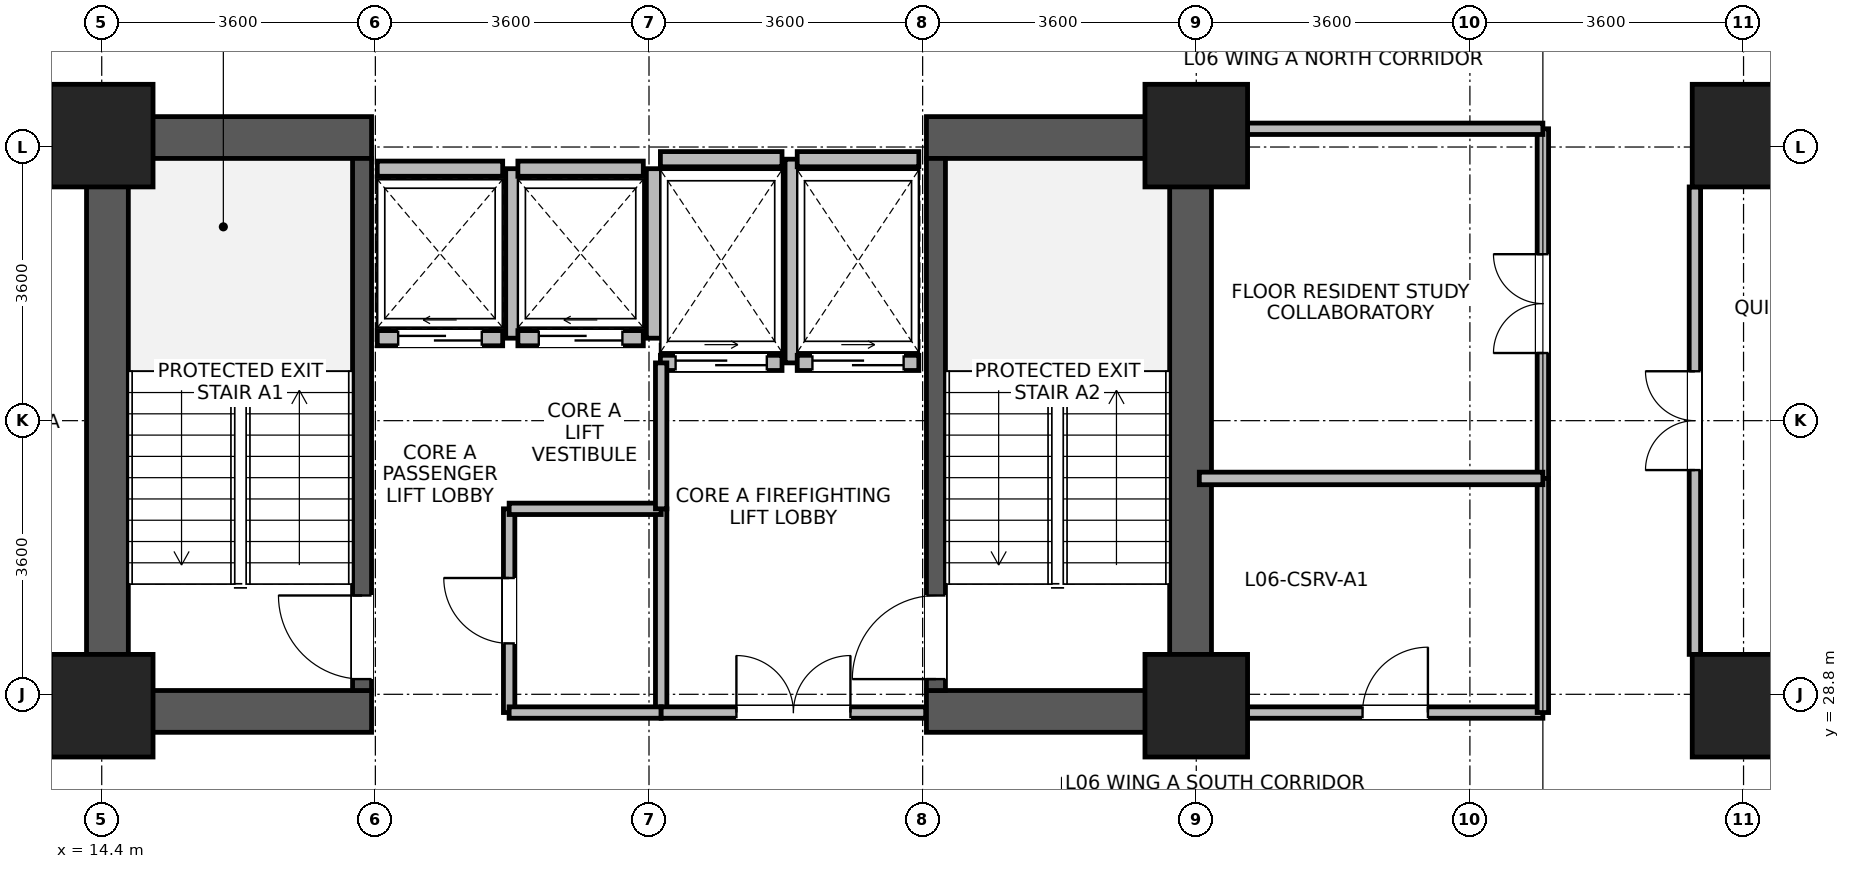
"""IFC4 building model, lengths in metres.
Left out: names, types, materials, properties, quantities, classifications, styles, units other than length and angle.
Written with IfcOpenShell. Run it as: python <this file> out.ifc"""

import sys

from ifc_helpers import new_model, si_unit, direction, frame, frame_2d, origin, origin_2d, place, context, subcontext, project, spatial, rectangle, extrude, source, transform, mapped, element, fill, save


model = new_model("IFC4")
c1 = context("Model", 3, precision=1e-05, world=origin(), true_north=direction((0.0, 1.0)))
c2 = subcontext(c1, "Body", "Model", "MODEL_VIEW")
j1 = project(units=[si_unit("LENGTHUNIT", "METRE"), si_unit("PLANEANGLEUNIT", "RADIAN")], contexts=[c1])
p1 = place(None, origin())
s1 = spatial("IfcSite", under=j1, at=p1, CompositionType="ELEMENT")
p2 = place(p1, origin())
s2 = spatial("IfcBuilding", under=s1, at=p2, CompositionType="ELEMENT")
p3 = place(p2, frame((0.0, 0.0, 29.0)))
s3 = spatial("IfcBuildingStorey", under=s2, at=p3, CompositionType="ELEMENT", Elevation=29.0)
for number, where, z_axis, x_axis in (
    (1, (14.475, 28.3, 0.0), (0.0, 0.0, 1.0), (0.0, 1.0, 0.0)),
    (2, (28.725, 28.3, 0.0), (0.0, 0.0, 1.0), (0.0, 1.0, 0.0)),
):
    element("IfcWall", number, at=place(p3, frame(where, z_axis=z_axis, x_axis=x_axis)), inside=s3, PredefinedType="SHEAR", context=c2, shape_type="SweptSolid", body=[
        extrude(rectangle(XDim=8.1, YDim=0.55, at=frame_2d((4.05, 0.0))), origin(), (0.0, 0.0, 1.0), 3.45),
    ])
for number, where, z_axis, x_axis in (
    (3, (14.75, 28.575, 0.0), (0.0, 0.0, 1.0), (1.0, 0.0, 0.0)),
    (4, (25.25, 28.575, 0.0), (0.0, 0.0, 1.0), (1.0, 0.0, 0.0)),
    (5, (14.75, 36.125, 0.0), (0.0, 0.0, 1.0), (1.0, 0.0, 0.0)),
    (6, (25.25, 36.125, 0.0), (0.0, 0.0, 1.0), (1.0, 0.0, 0.0)),
):
    element("IfcWall", number, at=place(p3, frame(where, z_axis=z_axis, x_axis=x_axis)), inside=s3, PredefinedType="SHEAR", context=c2, shape_type="SweptSolid", body=[
        extrude(rectangle(XDim=3.2, YDim=0.55, at=frame_2d((1.6, 0.0))), origin(), (0.0, 0.0, 1.0), 3.45),
    ])
p4 = place(p3, frame((17.825, 28.85, 0.0), z_axis=(0.0, 0.0, 1.0), x_axis=(0.0, 1.0, 0.0)))
e7 = element("IfcWall", 7, at=p4, inside=s3, PredefinedType="SHEAR", context=c2, shape_type="SweptSolid", body=[
    extrude(rectangle(XDim=7.0, YDim=0.25, at=frame_2d((3.5, 0.0))), origin(), (0.0, 0.0, 1.0), 3.45),
])
p5 = place(p4, frame((0.15, 0.0, 0.0)))
e8 = element("IfcOpeningElement", 8, at=p5, cuts=e7, PredefinedType="OPENING", context=c2, shape_type="SweptSolid", body=[
    extrude(rectangle(XDim=1.1, YDim=2.08, at=frame_2d((0.55, 1.04))), frame((0.0, 0.135, 0.0), z_axis=(0.0, -1.0, 0.0), x_axis=(1.0, 0.0, 0.0)), (0.0, 0.0, 1.0), 0.27),
])
p6 = place(p3, frame((25.375, 28.85, 0.0), z_axis=(0.0, 0.0, 1.0), x_axis=(0.0, 1.0, 0.0)))
e9 = element("IfcWall", 9, at=p6, inside=s3, PredefinedType="SHEAR", context=c2, shape_type="SweptSolid", body=[
    extrude(rectangle(XDim=7.0, YDim=0.25, at=frame_2d((3.5, 0.0))), origin(), (0.0, 0.0, 1.0), 3.45),
])
p7 = place(p6, frame((0.15, 0.0, 0.0)))
e10 = element("IfcOpeningElement", 10, at=p7, cuts=e9, PredefinedType="OPENING", context=c2, shape_type="SweptSolid", body=[
    extrude(rectangle(XDim=1.1, YDim=2.08, at=frame_2d((0.55, 1.04))), frame((0.0, 0.135, 0.0), z_axis=(0.0, -1.0, 0.0), x_axis=(1.0, 0.0, 0.0)), (0.0, 0.0, 1.0), 0.27),
])
m1 = source(origin(), c2, "Body", "SweptSolid", [
    extrude(rectangle(XDim=1.35, YDim=1.35, at=origin_2d()), origin(), (0.0, 0.0, 1.0), 3.7),
])
for number, where, z_axis, x_axis in (
    (11, (14.4, 28.65, 0.0), (0.0, 0.0, 1.0), (1.0, 0.0, 0.0)),
    (12, (14.4, 36.15, 0.0), (0.0, 0.0, 1.0), (1.0, 0.0, 0.0)),
    (13, (28.8, 28.65, 0.0), (0.0, 0.0, 1.0), (1.0, 0.0, 0.0)),
    (14, (28.8, 36.15, 0.0), (0.0, 0.0, 1.0), (1.0, 0.0, 0.0)),
    (15, (36.0, 28.65, 0.0), (0.0, 0.0, 1.0), (1.0, 0.0, 0.0)),
    (16, (36.0, 36.15, 0.0), (0.0, 0.0, 1.0), (1.0, 0.0, 0.0)),
):
    element("IfcColumn", number, at=place(p3, frame(where, z_axis=z_axis, x_axis=x_axis)), inside=s3, PredefinedType="COLUMN", context=c2, shape_type="MappedRepresentation", body=[
        mapped(m1, transform((0.0, 0.0, 0.0), x_axis=(1.0, 0.0, 0.0), y_axis=(0.0, 1.0, 0.0), z_axis=(0.0, 0.0, 1.0), scale=1.0)),
    ])
p8 = place(p3, frame((18.025, 33.485, 0.0), z_axis=(0.0, 0.0, 1.0), x_axis=(1.0, 0.0, 0.0)))
e17 = element("IfcWall", 17, at=p8, inside=s3, PredefinedType="PARTITIONING", context=c2, shape_type="SweptSolid", body=[
    extrude(rectangle(XDim=1.65, YDim=0.2, at=frame_2d((0.825, 0.0))), origin(), (0.0, 0.0, 1.0), 3.43),
])
p9 = place(p8, frame((0.275, 0.0, 0.0)))
e18 = element("IfcOpeningElement", 18, at=p9, cuts=e17, PredefinedType="OPENING", context=c2, shape_type="SweptSolid", body=[
    extrude(rectangle(XDim=1.1, YDim=2.12, at=frame_2d((0.55, 1.06))), frame((0.0, 0.11, 0.0), z_axis=(0.0, -1.0, 0.0), x_axis=(1.0, 0.0, 0.0)), (0.0, 0.0, 1.0), 0.22),
])
p10 = place(p3, frame((18.025, 35.715, 0.0), z_axis=(0.0, 0.0, 1.0), x_axis=(1.0, 0.0, 0.0)))
e19 = element("IfcWall", 19, at=p10, inside=s3, PredefinedType="PARTITIONING", context=c2, shape_type="SweptSolid", body=[
    extrude(rectangle(XDim=1.65, YDim=0.2, at=frame_2d((0.825, 0.0))), origin(), (0.0, 0.0, 1.0), 2.23),
])
p11 = place(p3, frame((19.815, 33.485, 0.0), z_axis=(0.0, 0.0, 1.0), x_axis=(0.0, 1.0, 0.0)))
e20 = element("IfcWall", 20, at=p11, inside=s3, PredefinedType="PARTITIONING", context=c2, shape_type="SweptSolid", body=[
    extrude(rectangle(XDim=2.23, YDim=0.2, at=frame_2d((1.115, 0.0))), origin(), (0.0, 0.0, 1.0), 3.43),
])
p12 = place(p3, frame((19.875, 33.485, 0.0), z_axis=(0.0, 0.0, 1.0), x_axis=(1.0, 0.0, 0.0)))
e21 = element("IfcWall", 21, at=p12, inside=s3, PredefinedType="PARTITIONING", context=c2, shape_type="SweptSolid", body=[
    extrude(rectangle(XDim=1.65, YDim=0.2, at=frame_2d((0.825, 0.0))), origin(), (0.0, 0.0, 1.0), 3.43),
])
p13 = place(p12, frame((0.275, 0.0, 0.0)))
e22 = element("IfcOpeningElement", 22, at=p13, cuts=e21, PredefinedType="OPENING", context=c2, shape_type="SweptSolid", body=[
    extrude(rectangle(XDim=1.1, YDim=2.12, at=frame_2d((0.55, 1.06))), frame((0.0, 0.11, 0.0), z_axis=(0.0, -1.0, 0.0), x_axis=(1.0, 0.0, 0.0)), (0.0, 0.0, 1.0), 0.22),
])
p14 = place(p3, frame((19.875, 35.715, 0.0), z_axis=(0.0, 0.0, 1.0), x_axis=(1.0, 0.0, 0.0)))
e23 = element("IfcWall", 23, at=p14, inside=s3, PredefinedType="PARTITIONING", context=c2, shape_type="SweptSolid", body=[
    extrude(rectangle(XDim=1.65, YDim=0.2, at=frame_2d((0.825, 0.0))), origin(), (0.0, 0.0, 1.0), 2.23),
])
p15 = place(p3, frame((21.665, 33.485, 0.0), z_axis=(0.0, 0.0, 1.0), x_axis=(0.0, 1.0, 0.0)))
e24 = element("IfcWall", 24, at=p15, inside=s3, PredefinedType="PARTITIONING", context=c2, shape_type="SweptSolid", body=[
    extrude(rectangle(XDim=2.23, YDim=0.2, at=frame_2d((1.115, 0.0))), origin(), (0.0, 0.0, 1.0), 3.43),
])
p16 = place(p3, frame((21.75, 33.16, 0.0), z_axis=(0.0, 0.0, 1.0), x_axis=(1.0, 0.0, 0.0)))
e25 = element("IfcWall", 25, at=p16, inside=s3, PredefinedType="PARTITIONING", context=c2, shape_type="SweptSolid", body=[
    extrude(rectangle(XDim=1.6, YDim=0.2, at=frame_2d((0.8, 0.0))), origin(), (0.0, 0.0, 1.0), 3.43),
])
p17 = place(p16, frame((0.2, 0.0, 0.0)))
e26 = element("IfcOpeningElement", 26, at=p17, cuts=e25, PredefinedType="OPENING", context=c2, shape_type="SweptSolid", body=[
    extrude(rectangle(XDim=1.2, YDim=2.12, at=frame_2d((0.6, 1.06))), frame((0.0, 0.11, 0.0), z_axis=(0.0, -1.0, 0.0), x_axis=(1.0, 0.0, 0.0)), (0.0, 0.0, 1.0), 0.22),
])
p18 = place(p3, frame((21.75, 35.84, 0.0), z_axis=(0.0, 0.0, 1.0), x_axis=(1.0, 0.0, 0.0)))
e27 = element("IfcWall", 27, at=p18, inside=s3, PredefinedType="PARTITIONING", context=c2, shape_type="SweptSolid", body=[
    extrude(rectangle(XDim=1.6, YDim=0.2, at=frame_2d((0.8, 0.0))), origin(), (0.0, 0.0, 1.0), 2.23),
])
p19 = place(p3, frame((23.49, 33.16, 0.0), z_axis=(0.0, 0.0, 1.0), x_axis=(0.0, 1.0, 0.0)))
e28 = element("IfcWall", 28, at=p19, inside=s3, PredefinedType="PARTITIONING", context=c2, shape_type="SweptSolid", body=[
    extrude(rectangle(XDim=2.68, YDim=0.2, at=frame_2d((1.34, 0.0))), origin(), (0.0, 0.0, 1.0), 3.43),
])
p20 = place(p3, frame((23.55, 33.16, 0.0), z_axis=(0.0, 0.0, 1.0), x_axis=(1.0, 0.0, 0.0)))
e29 = element("IfcWall", 29, at=p20, inside=s3, PredefinedType="PARTITIONING", context=c2, shape_type="SweptSolid", body=[
    extrude(rectangle(XDim=1.6, YDim=0.2, at=frame_2d((0.8, 0.0))), origin(), (0.0, 0.0, 1.0), 3.43),
])
p21 = place(p20, frame((0.2, 0.0, 0.0)))
e30 = element("IfcOpeningElement", 30, at=p21, cuts=e29, PredefinedType="OPENING", context=c2, shape_type="SweptSolid", body=[
    extrude(rectangle(XDim=1.2, YDim=2.12, at=frame_2d((0.6, 1.06))), frame((0.0, 0.11, 0.0), z_axis=(0.0, -1.0, 0.0), x_axis=(1.0, 0.0, 0.0)), (0.0, 0.0, 1.0), 0.22),
])
p22 = place(p3, frame((23.55, 35.84, 0.0), z_axis=(0.0, 0.0, 1.0), x_axis=(1.0, 0.0, 0.0)))
e31 = element("IfcWall", 31, at=p22, inside=s3, PredefinedType="PARTITIONING", context=c2, shape_type="SweptSolid", body=[
    extrude(rectangle(XDim=1.6, YDim=0.2, at=frame_2d((0.8, 0.0))), origin(), (0.0, 0.0, 1.0), 2.23),
])
p23 = place(p3, frame((35.36, 29.325, 0.0), z_axis=(0.0, 0.0, 1.0), x_axis=(0.0, 1.0, 0.0)))
e32 = element("IfcWall", 32, at=p23, inside=s3, PredefinedType="PARTITIONING", context=c2, shape_type="SweptSolid", body=[
    extrude(rectangle(XDim=6.15, YDim=0.15, at=frame_2d((3.075, 0.0))), origin(), (0.0, 0.0, 1.0), 3.43),
])
p24 = place(p23, frame((2.425, 0.0, 0.0)))
e33 = element("IfcOpeningElement", 33, at=p24, cuts=e32, PredefinedType="OPENING", context=c2, shape_type="SweptSolid", body=[
    extrude(rectangle(XDim=1.3, YDim=2.12, at=frame_2d((0.65, 1.06))), frame((0.0, 0.085, 0.0), z_axis=(0.0, -1.0, 0.0), x_axis=(1.0, 0.0, 0.0)), (0.0, 0.0, 1.0), 0.17),
])
p25 = place(p3, frame((33.36, 31.64, 0.0), z_axis=(0.0, 0.0, 1.0), x_axis=(0.0, 1.0, 0.0)))
e34 = element("IfcWall", 34, at=p25, inside=s3, PredefinedType="PARTITIONING", context=c2, shape_type="SweptSolid", body=[
    extrude(rectangle(XDim=4.6, YDim=0.15, at=frame_2d((2.3, 0.0))), origin(), (0.0, 0.0, 1.0), 3.43),
])
p26 = place(p25, frame((1.65, 0.0, 0.0)))
e35 = element("IfcOpeningElement", 35, at=p26, cuts=e34, PredefinedType="OPENING", context=c2, shape_type="SweptSolid", body=[
    extrude(rectangle(XDim=1.3, YDim=2.12, at=frame_2d((0.65, 1.06))), frame((0.0, 0.085, 0.0), z_axis=(0.0, -1.0, 0.0), x_axis=(1.0, 0.0, 0.0)), (0.0, 0.0, 1.0), 0.17),
])
p27 = place(p3, frame((29.475, 28.56, 0.0), z_axis=(0.0, 0.0, 1.0), x_axis=(1.0, 0.0, 0.0)))
e36 = element("IfcWall", 36, at=p27, inside=s3, PredefinedType="PARTITIONING", context=c2, shape_type="SweptSolid", body=[
    extrude(rectangle(XDim=3.885, YDim=0.15, at=frame_2d((1.942, 0.0))), origin(), (0.0, 0.0, 1.0), 2.78),
])
p28 = place(p27, frame((1.512, 0.0, 0.0)))
e37 = element("IfcOpeningElement", 37, at=p28, cuts=e36, PredefinedType="OPENING", context=c2, shape_type="SweptSolid", body=[
    extrude(rectangle(XDim=0.86, YDim=2.02, at=frame_2d((0.43, 1.01))), frame((0.0, 0.085, 0.0), z_axis=(0.0, -1.0, 0.0), x_axis=(1.0, 0.0, 0.0)), (0.0, 0.0, 1.0), 0.17),
])
p29 = place(p3, frame((29.475, 36.24, 0.0), z_axis=(0.0, 0.0, 1.0), x_axis=(1.0, 0.0, 0.0)))
e38 = element("IfcWall", 38, at=p29, inside=s3, PredefinedType="PARTITIONING", context=c2, shape_type="SweptSolid", body=[
    extrude(rectangle(XDim=3.885, YDim=0.15, at=frame_2d((1.942, 0.0))), origin(), (0.0, 0.0, 1.0), 2.78),
])
p30 = place(p3, frame((33.36, 28.56, 0.0), z_axis=(0.0, 0.0, 1.0), x_axis=(0.0, 1.0, 0.0)))
e39 = element("IfcWall", 39, at=p30, inside=s3, PredefinedType="PARTITIONING", context=c2, shape_type="SweptSolid", body=[
    extrude(rectangle(XDim=3.08, YDim=0.15, at=frame_2d((1.54, 0.0))), origin(), (0.0, 0.0, 1.0), 3.43),
])
p31 = place(p3, frame((19.76, 28.56, 0.0), z_axis=(0.0, 0.0, 1.0), x_axis=(0.0, 1.0, 0.0)))
e40 = element("IfcWall", 40, at=p31, inside=s3, PredefinedType="PARTITIONING", context=c2, shape_type="SweptSolid", body=[
    extrude(rectangle(XDim=2.68, YDim=0.15, at=frame_2d((1.34, 0.0))), origin(), (0.0, 0.0, 1.0), 3.43),
])
p32 = place(p31, frame((0.91, 0.0, 0.0)))
e41 = element("IfcOpeningElement", 41, at=p32, cuts=e40, PredefinedType="OPENING", context=c2, shape_type="SweptSolid", body=[
    extrude(rectangle(XDim=0.86, YDim=2.02, at=frame_2d((0.43, 1.01))), frame((0.0, 0.085, 0.0), z_axis=(0.0, -1.0, 0.0), x_axis=(1.0, 0.0, 0.0)), (0.0, 0.0, 1.0), 0.17),
])
p33 = place(p3, frame((21.76, 28.56, 0.0), z_axis=(0.0, 0.0, 1.0), x_axis=(0.0, 1.0, 0.0)))
e42 = element("IfcWall", 42, at=p33, inside=s3, PredefinedType="PARTITIONING", context=c2, shape_type="SweptSolid", body=[
    extrude(rectangle(XDim=2.68, YDim=0.15, at=frame_2d((1.34, 0.0))), origin(), (0.0, 0.0, 1.0), 3.43),
])
p34 = place(p3, frame((19.76, 28.56, 0.0), z_axis=(0.0, 0.0, 1.0), x_axis=(1.0, 0.0, 0.0)))
e43 = element("IfcWall", 43, at=p34, inside=s3, PredefinedType="PARTITIONING", context=c2, shape_type="SweptSolid", body=[
    extrude(rectangle(XDim=2.0, YDim=0.15, at=frame_2d((1.0, 0.0))), origin(), (0.0, 0.0, 1.0), 2.23),
])
p35 = place(p3, frame((19.76, 31.24, 0.0), z_axis=(0.0, 0.0, 1.0), x_axis=(1.0, 0.0, 0.0)))
e44 = element("IfcWall", 44, at=p35, inside=s3, PredefinedType="PARTITIONING", context=c2, shape_type="SweptSolid", body=[
    extrude(rectangle(XDim=2.0, YDim=0.15, at=frame_2d((1.0, 0.0))), origin(), (0.0, 0.0, 1.0), 3.43),
])
p36 = place(p3, frame((28.84, 31.64, 0.0), z_axis=(0.0, 0.0, 1.0), x_axis=(1.0, 0.0, 0.0)))
e45 = element("IfcWall", 45, at=p36, inside=s3, PredefinedType="PARTITIONING", context=c2, shape_type="SweptSolid", body=[
    extrude(rectangle(XDim=4.52, YDim=0.165, at=frame_2d((2.26, 0.0))), origin(), (0.0, 0.0, 1.0), 3.43),
])
p37 = place(p3, frame((21.76, 28.56, 0.0), z_axis=(0.0, 0.0, 1.0), x_axis=(1.0, 0.0, 0.0)))
e46 = element("IfcWall", 46, at=p37, inside=s3, PredefinedType="PARTITIONING", context=c2, shape_type="SweptSolid", body=[
    extrude(rectangle(XDim=3.48, YDim=0.15, at=frame_2d((1.74, 0.0))), origin(), (0.0, 0.0, 1.0), 2.23),
])
p38 = place(p37, frame((0.99, 0.0, 0.0)))
e47 = element("IfcOpeningElement", 47, at=p38, cuts=e46, PredefinedType="OPENING", context=c2, shape_type="SweptSolid", body=[
    extrude(rectangle(XDim=1.5, YDim=2.1, at=frame_2d((0.75, 1.05))), frame((0.0, 0.085, 0.0), z_axis=(0.0, -1.0, 0.0), x_axis=(1.0, 0.0, 0.0)), (0.0, 0.0, 1.0), 0.17),
])
p39 = place(p3, frame((21.76, 31.24, 0.0), z_axis=(0.0, 0.0, 1.0), x_axis=(0.0, 1.0, 0.0)))
e48 = element("IfcWall", 48, at=p39, inside=s3, PredefinedType="PARTITIONING", context=c2, shape_type="SweptSolid", body=[
    extrude(rectangle(XDim=1.92, YDim=0.15, at=frame_2d((0.96, 0.0))), origin(), (0.0, 0.0, 1.0), 3.43),
])
p40 = place(p5, origin())
e49 = element("IfcDoor", 49, at=p40, inside=s3, OperationType="SINGLE_SWING_RIGHT", PredefinedType="DOOR", context=c2, shape_type="SweptSolid", body=[
    extrude(rectangle(XDim=1.1, YDim=2.08, at=frame_2d((0.55, 1.04))), frame((0.0, 0.025, 0.0), z_axis=(0.0, -1.0, 0.0), x_axis=(1.0, 0.0, 0.0)), (0.0, 0.0, 1.0), 0.05),
])
fill(e8, e49)
p41 = place(p7, origin())
e50 = element("IfcDoor", 50, at=p41, inside=s3, OperationType="SINGLE_SWING_LEFT", PredefinedType="DOOR", context=c2, shape_type="SweptSolid", body=[
    extrude(rectangle(XDim=1.1, YDim=2.08, at=frame_2d((0.55, 1.04))), frame((0.0, 0.025, 0.0), z_axis=(0.0, -1.0, 0.0), x_axis=(1.0, 0.0, 0.0)), (0.0, 0.0, 1.0), 0.05),
])
fill(e10, e50)
p42 = place(p9, origin())
e51 = element("IfcDoor", 51, at=p42, inside=s3, OperationType="SLIDING_TO_LEFT", PredefinedType="DOOR", context=c2, shape_type="SweptSolid", body=[
    extrude(rectangle(XDim=1.1, YDim=2.12, at=frame_2d((0.55, 1.06))), frame((0.0, 0.025, 0.0), z_axis=(0.0, -1.0, 0.0), x_axis=(1.0, 0.0, 0.0)), (0.0, 0.0, 1.0), 0.05),
])
fill(e18, e51)
p43 = place(p13, origin())
e52 = element("IfcDoor", 52, at=p43, inside=s3, OperationType="SLIDING_TO_LEFT", PredefinedType="DOOR", context=c2, shape_type="SweptSolid", body=[
    extrude(rectangle(XDim=1.1, YDim=2.12, at=frame_2d((0.55, 1.06))), frame((0.0, 0.025, 0.0), z_axis=(0.0, -1.0, 0.0), x_axis=(1.0, 0.0, 0.0)), (0.0, 0.0, 1.0), 0.05),
])
fill(e22, e52)
p44 = place(p17, origin())
e53 = element("IfcDoor", 53, at=p44, inside=s3, OperationType="SLIDING_TO_RIGHT", PredefinedType="DOOR", context=c2, shape_type="SweptSolid", body=[
    extrude(rectangle(XDim=1.2, YDim=2.12, at=frame_2d((0.6, 1.06))), frame((0.0, 0.025, 0.0), z_axis=(0.0, -1.0, 0.0), x_axis=(1.0, 0.0, 0.0)), (0.0, 0.0, 1.0), 0.05),
])
fill(e26, e53)
p45 = place(p21, origin())
e54 = element("IfcDoor", 54, at=p45, inside=s3, OperationType="SLIDING_TO_RIGHT", PredefinedType="DOOR", context=c2, shape_type="SweptSolid", body=[
    extrude(rectangle(XDim=1.2, YDim=2.12, at=frame_2d((0.6, 1.06))), frame((0.0, 0.025, 0.0), z_axis=(0.0, -1.0, 0.0), x_axis=(1.0, 0.0, 0.0)), (0.0, 0.0, 1.0), 0.05),
])
fill(e30, e54)
p46 = place(p24, origin())
e55 = element("IfcDoor", 55, at=p46, inside=s3, OperationType="DOUBLE_DOOR_SINGLE_SWING", PredefinedType="DOOR", context=c2, shape_type="SweptSolid", body=[
    extrude(rectangle(XDim=1.3, YDim=2.12, at=frame_2d((0.65, 1.06))), frame((0.0, 0.025, 0.0), z_axis=(0.0, -1.0, 0.0), x_axis=(1.0, 0.0, 0.0)), (0.0, 0.0, 1.0), 0.05),
])
fill(e33, e55)
p47 = place(p26, origin())
e56 = element("IfcDoor", 56, at=p47, inside=s3, OperationType="DOUBLE_DOOR_SINGLE_SWING", PredefinedType="DOOR", context=c2, shape_type="SweptSolid", body=[
    extrude(rectangle(XDim=1.3, YDim=2.12, at=frame_2d((0.65, 1.06))), frame((0.0, 0.025, 0.0), z_axis=(0.0, -1.0, 0.0), x_axis=(1.0, 0.0, 0.0)), (0.0, 0.0, 1.0), 0.05),
])
fill(e35, e56)
p48 = place(p28, origin())
e57 = element("IfcDoor", 57, at=p48, inside=s3, OperationType="SINGLE_SWING_RIGHT", PredefinedType="DOOR", context=c2, shape_type="SweptSolid", body=[
    extrude(rectangle(XDim=0.86, YDim=2.02, at=frame_2d((0.43, 1.01))), frame((0.0, 0.025, 0.0), z_axis=(0.0, -1.0, 0.0), x_axis=(1.0, 0.0, 0.0)), (0.0, 0.0, 1.0), 0.05),
])
fill(e37, e57)
p49 = place(p32, origin())
e58 = element("IfcDoor", 58, at=p49, inside=s3, OperationType="SINGLE_SWING_RIGHT", PredefinedType="DOOR", context=c2, shape_type="SweptSolid", body=[
    extrude(rectangle(XDim=0.86, YDim=2.02, at=frame_2d((0.43, 1.01))), frame((0.0, 0.025, 0.0), z_axis=(0.0, -1.0, 0.0), x_axis=(1.0, 0.0, 0.0)), (0.0, 0.0, 1.0), 0.05),
])
fill(e41, e58)
p50 = place(p38, origin())
e59 = element("IfcDoor", 59, at=p50, inside=s3, OperationType="DOUBLE_DOOR_SINGLE_SWING", PredefinedType="DOOR", context=c2, shape_type="SweptSolid", body=[
    extrude(rectangle(XDim=1.5, YDim=2.1, at=frame_2d((0.75, 1.05))), frame((0.0, 0.025, 0.0), z_axis=(0.0, -1.0, 0.0), x_axis=(1.0, 0.0, 0.0)), (0.0, 0.0, 1.0), 0.05),
])
fill(e47, e59)
save(model, sys.argv[1])
